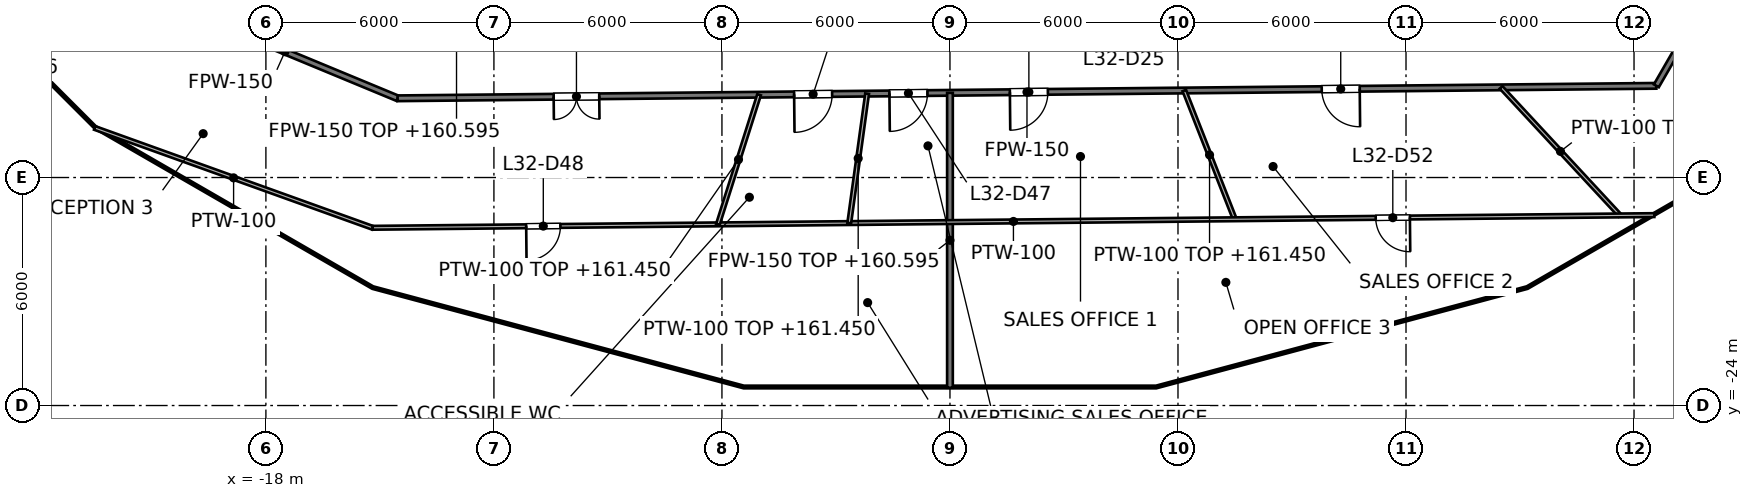
"""IFC4 building model, lengths in metres.
Left out: names, types, materials, properties, quantities, classifications, styles, units other than length and angle.
Written with IfcOpenShell. Run it as: python <this file> out.ifc"""

import sys

from ifc_helpers import new_model, si_unit, direction, frame, frame_2d, origin, place, context, subcontext, project, spatial, rectangle, extrude, element, fill, save


model = new_model("IFC4")
c1 = context("Model", 3, precision=1e-05, world=origin(), true_north=direction((0.0, 1.0)))
c2 = subcontext(c1, "Body", "Model", "MODEL_VIEW")
j1 = project(units=[si_unit("LENGTHUNIT", "METRE"), si_unit("PLANEANGLEUNIT", "RADIAN")], contexts=[c1])
p1 = place(None, origin())
s1 = spatial("IfcSite", under=j1, at=p1, CompositionType="ELEMENT")
p2 = place(p1, origin())
s2 = spatial("IfcBuilding", under=s1, at=p2, CompositionType="ELEMENT")
p3 = place(p2, frame((0.0, 0.0, 157.6)))
s3 = spatial("IfcBuildingStorey", under=s2, at=p3, CompositionType="ELEMENT", Elevation=157.6)
p4 = place(p3, frame((-20.46, -13.46, 0.0), z_axis=(0.0, 0.0, 1.0), x_axis=(0.923801547606, -0.382871650349, 0.0)))
e1 = element("IfcWall", 1, at=p4, inside=s3, PredefinedType="PARTITIONING", context=c2, shape_type="SweptSolid", body=[
    extrude(rectangle(XDim=6.415, YDim=0.15, at=frame_2d((3.208, 0.0))), origin(), (0.0, 0.0, 1.0), 2.927),
])
p5 = place(p3, frame((-14.534, -15.915, 0.0), z_axis=(0.0, 0.0, 1.0), x_axis=(0.999950930262, 0.009906415532, 0.0)))
e2 = element("IfcWall", 2, at=p5, inside=s3, PredefinedType="PARTITIONING", context=c2, shape_type="SweptSolid", body=[
    extrude(rectangle(XDim=33.123, YDim=0.15, at=frame_2d((16.561, 0.0))), origin(), (0.0, 0.0, 1.0), 2.927),
])
p6 = place(p5, frame((4.106, 0.0, 0.0)))
e3 = element("IfcOpeningElement", 3, at=p6, cuts=e2, PredefinedType="OPENING", context=c2, shape_type="SweptSolid", body=[
    extrude(rectangle(XDim=1.2, YDim=2.1, at=frame_2d((0.6, 1.05))), frame((0.0, 0.075, 0.0), z_axis=(0.0, -1.0, 0.0), x_axis=(1.0, 0.0, 0.0)), (0.0, 0.0, 1.0), 0.15),
])
p7 = place(p5, frame((10.434, 0.0, 0.0)))
e4 = element("IfcOpeningElement", 4, at=p7, cuts=e2, PredefinedType="OPENING", context=c2, shape_type="SweptSolid", body=[
    extrude(rectangle(XDim=1.0, YDim=2.1, at=frame_2d((0.5, 1.05))), frame((0.0, 0.075, 0.0), z_axis=(0.0, -1.0, 0.0), x_axis=(1.0, 0.0, 0.0)), (0.0, 0.0, 1.0), 0.15),
])
p8 = place(p5, frame((12.942, 0.0, 0.0)))
e5 = element("IfcOpeningElement", 5, at=p8, cuts=e2, PredefinedType="OPENING", context=c2, shape_type="SweptSolid", body=[
    extrude(rectangle(XDim=1.0, YDim=2.1, at=frame_2d((0.5, 1.05))), frame((0.0, 0.075, 0.0), z_axis=(0.0, -1.0, 0.0), x_axis=(1.0, 0.0, 0.0)), (0.0, 0.0, 1.0), 0.15),
])
p9 = place(p5, frame((16.111, 0.0, 0.0)))
e6 = element("IfcOpeningElement", 6, at=p9, cuts=e2, PredefinedType="OPENING", context=c2, shape_type="SweptSolid", body=[
    extrude(rectangle(XDim=1.0, YDim=2.1, at=frame_2d((0.5, 1.05))), frame((0.0, 0.075, 0.0), z_axis=(0.0, -1.0, 0.0), x_axis=(1.0, 0.0, 0.0)), (0.0, 0.0, 1.0), 0.15),
])
p10 = place(p5, frame((24.318, 0.0, 0.0)))
e7 = element("IfcOpeningElement", 7, at=p10, cuts=e2, PredefinedType="OPENING", context=c2, shape_type="SweptSolid", body=[
    extrude(rectangle(XDim=1.0, YDim=2.1, at=frame_2d((0.5, 1.05))), frame((0.0, 0.075, 0.0), z_axis=(0.0, -1.0, 0.0), x_axis=(1.0, 0.0, 0.0)), (0.0, 0.0, 1.0), 0.15),
])
p11 = place(p3, frame((18.587, -15.587, 0.0), z_axis=(0.0, 0.0, 1.0), x_axis=(0.500005419212, 0.866022274979, 0.0)))
e8 = element("IfcWall", 8, at=p11, inside=s3, PredefinedType="PARTITIONING", context=c2, shape_type="SweptSolid", body=[
    extrude(rectangle(XDim=8.713, YDim=0.15, at=frame_2d((4.357, 0.0))), origin(), (0.0, 0.0, 1.0), 2.927),
])
p12 = place(p11, frame((3.808, 0.0, 0.0)))
e9 = element("IfcOpeningElement", 9, at=p12, cuts=e8, PredefinedType="OPENING", context=c2, shape_type="SweptSolid", body=[
    extrude(rectangle(XDim=1.0, YDim=2.1, at=frame_2d((0.5, 1.05))), frame((0.0, 0.075, 0.0), z_axis=(0.0, -1.0, 0.0), x_axis=(1.0, 0.0, 0.0)), (0.0, 0.0, 1.0), 0.15),
])
p13 = place(p3, frame((0.0, -23.532, 0.0), z_axis=(0.0, 0.0, 1.0), x_axis=(0.0, 1.0, 0.0)))
e10 = element("IfcWall", 10, at=p13, inside=s3, PredefinedType="PARTITIONING", context=c2, shape_type="SweptSolid", body=[
    extrude(rectangle(XDim=7.76, YDim=0.15, at=frame_2d((3.88, 0.0))), origin(), (0.0, 0.0, 1.0), 2.995),
])
p14 = place(p3, frame((6.166, -15.711, 0.0), z_axis=(0.0, 0.0, 1.0), x_axis=(0.365297341245, -0.930890891823, 0.0)))
e11 = element("IfcWall", 11, at=p14, inside=s3, PredefinedType="PARTITIONING", context=c2, shape_type="SweptSolid", body=[
    extrude(rectangle(XDim=3.638, YDim=0.1, at=frame_2d((1.819, 0.0))), origin(), (0.0, 0.0, 1.0), 3.85),
])
p15 = place(p3, frame((14.501, -15.628, 0.0), z_axis=(0.0, 0.0, 1.0), x_axis=(0.680157643832, -0.73306587667, 0.0)))
e12 = element("IfcWall", 12, at=p15, inside=s3, PredefinedType="PARTITIONING", context=c2, shape_type="SweptSolid", body=[
    extrude(rectangle(XDim=4.596, YDim=0.1, at=frame_2d((2.298, 0.0))), origin(), (0.0, 0.0, 1.0), 3.85),
])
p16 = place(p3, frame((-22.506, -16.695, 0.0), z_axis=(0.0, 0.0, 1.0), x_axis=(0.941067528236, -0.338218727009, 0.0)))
e13 = element("IfcWall", 13, at=p16, inside=s3, PredefinedType="PARTITIONING", context=c2, shape_type="SweptSolid", body=[
    extrude(rectangle(XDim=7.77, YDim=0.1, at=frame_2d((3.885, 0.0))), origin(), (0.0, 0.0, 1.0), 2.927),
])
p17 = place(p3, frame((-15.194, -19.323, 0.0), z_axis=(0.0, 0.0, 1.0), x_axis=(0.999950976029, 0.009901794681, 0.0)))
e14 = element("IfcWall", 14, at=p17, inside=s3, PredefinedType="PARTITIONING", context=c2, shape_type="SweptSolid", body=[
    extrude(rectangle(XDim=33.73, YDim=0.1, at=frame_2d((16.865, 0.0))), origin(), (0.0, 0.0, 1.0), 2.927),
])
p18 = place(p17, frame((4.043, 0.0, 0.0)))
e15 = element("IfcOpeningElement", 15, at=p18, cuts=e14, PredefinedType="OPENING", context=c2, shape_type="SweptSolid", body=[
    extrude(rectangle(XDim=0.9, YDim=2.1, at=frame_2d((0.45, 1.05))), frame((0.0, 0.05, 0.0), z_axis=(0.0, -1.0, 0.0), x_axis=(1.0, 0.0, 0.0)), (0.0, 0.0, 1.0), 0.1),
])
p19 = place(p17, frame((26.398, 0.0, 0.0)))
e16 = element("IfcOpeningElement", 16, at=p19, cuts=e14, PredefinedType="OPENING", context=c2, shape_type="SweptSolid", body=[
    extrude(rectangle(XDim=0.9, YDim=2.1, at=frame_2d((0.45, 1.05))), frame((0.0, 0.05, 0.0), z_axis=(0.0, -1.0, 0.0), x_axis=(1.0, 0.0, 0.0)), (0.0, 0.0, 1.0), 0.1),
])
p20 = place(p3, frame((-6.106, -19.233, 0.0), z_axis=(0.0, 0.0, 1.0), x_axis=(0.302626350856, 0.95310927588, 0.0)))
e17 = element("IfcWall", 17, at=p20, inside=s3, PredefinedType="PARTITIONING", context=c2, shape_type="SweptSolid", body=[
    extrude(rectangle(XDim=3.579, YDim=0.1, at=frame_2d((1.789, 0.0))), origin(), (0.0, 0.0, 1.0), 3.85),
])
p21 = place(p3, frame((-2.65, -19.198, 0.0), z_axis=(0.0, 0.0, 1.0), x_axis=(0.136764815741, 0.990603545913, 0.0)))
e18 = element("IfcWall", 18, at=p21, inside=s3, PredefinedType="PARTITIONING", context=c2, shape_type="SweptSolid", body=[
    extrude(rectangle(XDim=3.436, YDim=0.1, at=frame_2d((1.718, 0.0))), origin(), (0.0, 0.0, 1.0), 3.85),
])
p22 = place(p6, origin())
e19 = element("IfcDoor", 19, at=p22, inside=s3, OperationType="DOUBLE_DOOR_SINGLE_SWING", PredefinedType="DOOR", context=c2, shape_type="SweptSolid", body=[
    extrude(rectangle(XDim=1.2, YDim=2.1, at=frame_2d((0.6, 1.05))), frame((0.0, 0.025, 0.0), z_axis=(0.0, -1.0, 0.0), x_axis=(1.0, 0.0, 0.0)), (0.0, 0.0, 1.0), 0.05),
])
fill(e3, e19)
p23 = place(p7, origin())
e20 = element("IfcDoor", 20, at=p23, inside=s3, OperationType="SINGLE_SWING_LEFT", PredefinedType="DOOR", context=c2, shape_type="SweptSolid", body=[
    extrude(rectangle(XDim=1.0, YDim=2.1, at=frame_2d((0.5, 1.05))), frame((0.0, 0.025, 0.0), z_axis=(0.0, -1.0, 0.0), x_axis=(1.0, 0.0, 0.0)), (0.0, 0.0, 1.0), 0.05),
])
fill(e4, e20)
p24 = place(p8, origin())
e21 = element("IfcDoor", 21, at=p24, inside=s3, OperationType="SINGLE_SWING_LEFT", PredefinedType="DOOR", context=c2, shape_type="SweptSolid", body=[
    extrude(rectangle(XDim=1.0, YDim=2.1, at=frame_2d((0.5, 1.05))), frame((0.0, 0.025, 0.0), z_axis=(0.0, -1.0, 0.0), x_axis=(1.0, 0.0, 0.0)), (0.0, 0.0, 1.0), 0.05),
])
fill(e5, e21)
p25 = place(p18, origin())
e22 = element("IfcDoor", 22, at=p25, inside=s3, OperationType="SINGLE_SWING_LEFT", PredefinedType="DOOR", context=c2, shape_type="SweptSolid", body=[
    extrude(rectangle(XDim=0.9, YDim=2.1, at=frame_2d((0.45, 1.05))), frame((0.0, 0.025, 0.0), z_axis=(0.0, -1.0, 0.0), x_axis=(1.0, 0.0, 0.0)), (0.0, 0.0, 1.0), 0.05),
])
fill(e15, e22)
p26 = place(p9, origin())
e23 = element("IfcDoor", 23, at=p26, inside=s3, OperationType="SINGLE_SWING_LEFT", PredefinedType="DOOR", context=c2, shape_type="SweptSolid", body=[
    extrude(rectangle(XDim=1.0, YDim=2.1, at=frame_2d((0.5, 1.05))), frame((0.0, 0.025, 0.0), z_axis=(0.0, -1.0, 0.0), x_axis=(1.0, 0.0, 0.0)), (0.0, 0.0, 1.0), 0.05),
])
fill(e6, e23)
p27 = place(p10, origin())
e24 = element("IfcDoor", 24, at=p27, inside=s3, OperationType="SINGLE_SWING_RIGHT", PredefinedType="DOOR", context=c2, shape_type="SweptSolid", body=[
    extrude(rectangle(XDim=1.0, YDim=2.1, at=frame_2d((0.5, 1.05))), frame((0.0, 0.025, 0.0), z_axis=(0.0, -1.0, 0.0), x_axis=(1.0, 0.0, 0.0)), (0.0, 0.0, 1.0), 0.05),
])
fill(e7, e24)
p28 = place(p19, origin())
e25 = element("IfcDoor", 25, at=p28, inside=s3, OperationType="SINGLE_SWING_RIGHT", PredefinedType="DOOR", context=c2, shape_type="SweptSolid", body=[
    extrude(rectangle(XDim=0.9, YDim=2.1, at=frame_2d((0.45, 1.05))), frame((0.0, 0.025, 0.0), z_axis=(0.0, -1.0, 0.0), x_axis=(1.0, 0.0, 0.0)), (0.0, 0.0, 1.0), 0.05),
])
fill(e16, e25)
save(model, sys.argv[1])
